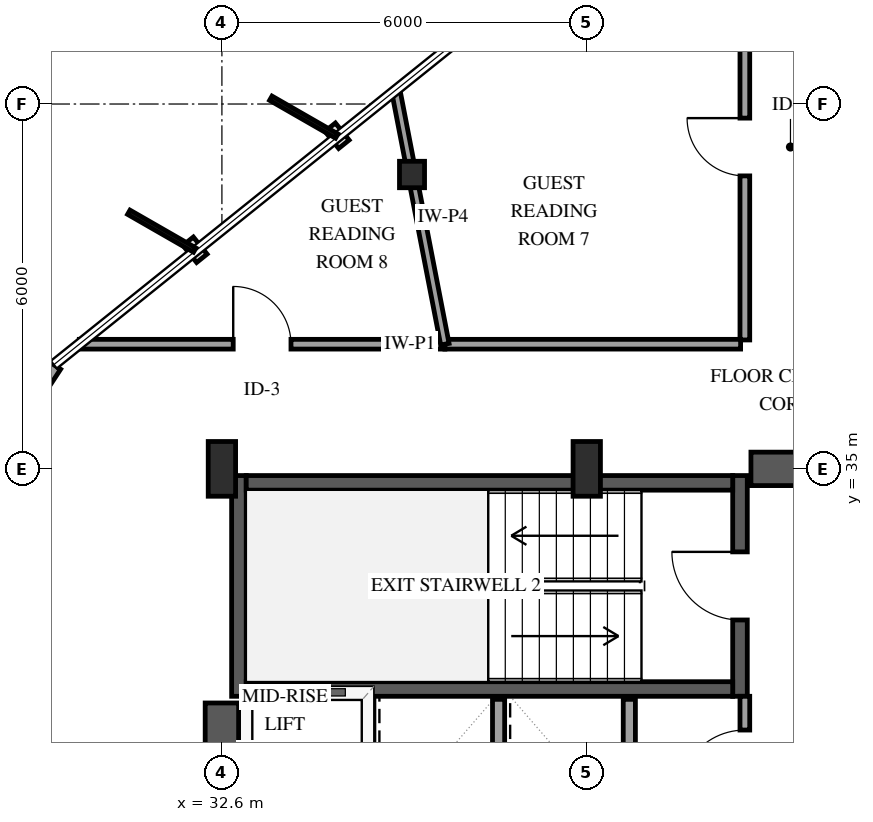
"""IFC4 building model, lengths in metres.
Left out: names, types, materials, properties, quantities, classifications, styles, units other than length and angle.
Written with IfcOpenShell. Run it as: python <this file> out.ifc"""

import sys

from ifc_helpers import new_model, si_unit, direction, frame, frame_2d, origin, origin_2d, place, context, subcontext, project, spatial, rectangle, i_section, extrude, element, fill, save


model = new_model("IFC4")
c1 = context("Model", 3, precision=1e-05, world=origin(), true_north=direction((0.0, 1.0)))
c2 = subcontext(c1, "Body", "Model", "MODEL_VIEW")
j1 = project(units=[si_unit("LENGTHUNIT", "METRE"), si_unit("PLANEANGLEUNIT", "RADIAN")], contexts=[c1])
p1 = place(None, origin())
s1 = spatial("IfcSite", under=j1, at=p1, CompositionType="ELEMENT")
p2 = place(p1, origin())
s2 = spatial("IfcBuilding", under=s1, at=p2, CompositionType="ELEMENT")
p3 = place(p2, frame((0.0, 0.0, 175.0)))
s3 = spatial("IfcBuildingStorey", under=s2, at=p3, CompositionType="ELEMENT", Elevation=175.0)
p4 = place(p3, frame((32.88, 31.26, 0.0), z_axis=(0.0, 0.0, 1.0), x_axis=(0.0, 1.0, 0.0)))
e1 = element("IfcWall", 1, at=p4, inside=s3, PredefinedType="SHEAR", context=c2, shape_type="SweptSolid", body=[
    extrude(rectangle(XDim=3.63, YDim=0.24, at=frame_2d((1.815, 0.0))), origin(), (0.0, 0.0, 1.0), 3.6),
])
p5 = place(p3, frame((41.12, 31.26, 0.0), z_axis=(0.0, 0.0, 1.0), x_axis=(0.0, 1.0, 0.0)))
e2 = element("IfcWall", 2, at=p5, inside=s3, PredefinedType="SHEAR", context=c2, shape_type="SweptSolid", body=[
    extrude(rectangle(XDim=3.63, YDim=0.24, at=frame_2d((1.815, 0.0))), origin(), (0.0, 0.0, 1.0), 3.6),
])
p6 = place(p5, frame((1.255, 0.0, 0.0)))
e3 = element("IfcOpeningElement", 3, at=p6, cuts=e2, PredefinedType="OPENING", context=c2, shape_type="SweptSolid", body=[
    extrude(rectangle(XDim=1.12, YDim=2.15, at=frame_2d((0.56, 1.075))), frame((0.0, 0.13, 0.0), z_axis=(0.0, -1.0, 0.0), x_axis=(1.0, 0.0, 0.0)), (0.0, 0.0, 1.0), 0.26),
])
for number, where, z_axis, x_axis in (
    (4, (33.0, 31.38, 0.0), (0.0, 0.0, 1.0), (1.0, 0.0, 0.0)),
    (5, (33.0, 34.77, 0.0), (0.0, 0.0, 1.0), (1.0, 0.0, 0.0)),
):
    element("IfcWall", number, at=place(p3, frame(where, z_axis=z_axis, x_axis=x_axis)), inside=s3, PredefinedType="SHEAR", context=c2, shape_type="SweptSolid", body=[
        extrude(rectangle(XDim=8.0, YDim=0.24, at=frame_2d((4.0, 0.0))), origin(), (0.0, 0.0, 1.0), 3.6),
    ])
p7 = place(p3, frame((32.6, 18.85, 0.0), z_axis=(0.0, 0.0, 1.0), x_axis=(0.0, 1.0, 0.0)))
e6 = element("IfcWall", 6, at=p7, inside=s3, PredefinedType="SHEAR", context=c2, shape_type="SweptSolid", body=[
    extrude(rectangle(XDim=12.3, YDim=0.55, at=frame_2d((6.15, 0.0))), origin(), (0.0, 0.0, 1.0), 3.6),
])
p8 = place(p3, frame((41.3, 35.0, 0.0), z_axis=(0.0, 0.0, 1.0), x_axis=(1.0, 0.0, 0.0)))
e7 = element("IfcWall", 7, at=p8, inside=s3, PredefinedType="SHEAR", context=c2, shape_type="SweptSolid", body=[
    extrude(rectangle(XDim=2.85, YDim=0.55, at=frame_2d((1.425, 0.0))), origin(), (0.0, 0.0, 1.0), 3.6),
])
for number, where, z_axis, x_axis in (
    (8, (32.6, 35.0, 0.0), (0.0, 0.0, 1.0), (1.0, 0.0, 0.0)),
    (9, (38.6, 35.0, 0.0), (0.0, 0.0, 1.0), (1.0, 0.0, 0.0)),
):
    element("IfcColumn", number, at=place(p3, frame(where, z_axis=z_axis, x_axis=x_axis)), inside=s3, PredefinedType="PILASTER", context=c2, shape_type="SweptSolid", body=[
        extrude(rectangle(XDim=0.45, YDim=0.9, at=origin_2d()), origin(), (0.0, 0.0, 1.0), 3.6),
    ])
p9 = place(p3, frame((35.726, 39.841, 0.0), z_axis=(0.0, 0.0, 1.0), x_axis=(1.0, 0.0, 0.0)))
e10 = element("IfcColumn", 10, at=p9, inside=s3, PredefinedType="COLUMN", context=c2, shape_type="SweptSolid", body=[
    extrude(i_section(OverallWidth=0.412, OverallDepth=0.435, WebThickness=0.036, FlangeThickness=0.057, FilletRadius=0.038, at=origin_2d()), origin(), (0.0, 0.0, 1.0), 3.6),
])
p10 = place(p3, frame((29.834, 36.713, 0.0), z_axis=(0.0, 0.0, 1.0), x_axis=(-0.548111634579, -0.836405186521, 0.0)))
e11 = element("IfcWall", 11, at=p10, inside=s3, PredefinedType="SOLIDWALL", context=c2, shape_type="SweptSolid", body=[
    extrude(rectangle(XDim=2.967, YDim=0.27, at=frame_2d((1.483, 0.0))), origin(), (0.0, 0.0, 1.0), 2.679),
])
p11 = place(p10, frame((1.033, 0.0, 0.75)))
e12 = element("IfcOpeningElement", 12, at=p11, cuts=e11, PredefinedType="OPENING", context=c2, shape_type="SweptSolid", body=[
    extrude(rectangle(XDim=0.9, YDim=1.5, at=frame_2d((0.45, 0.75))), frame((0.0, 0.145, 0.0), z_axis=(0.0, -1.0, 0.0), x_axis=(1.0, 0.0, 0.0)), (0.0, 0.0, 1.0), 0.29),
])
for number, where, z_axis, x_axis in (
    (13, (35.0, 29.11, 0.0), (0.0, 0.0, 1.0), (0.0, 1.0, 0.0)),
    (14, (37.15, 29.11, 0.0), (0.0, 0.0, 1.0), (0.0, 1.0, 0.0)),
    (15, (39.3, 29.11, 0.0), (0.0, 0.0, 1.0), (0.0, 1.0, 0.0)),
):
    element("IfcWall", number, at=place(p3, frame(where, z_axis=z_axis, x_axis=x_axis)), inside=s3, PredefinedType="SOLIDWALL", context=c2, shape_type="SweptSolid", body=[
        extrude(rectangle(XDim=2.1, YDim=0.2, at=frame_2d((1.05, 0.0))), origin(), (0.0, 0.0, 1.0), 3.3),
    ])
p12 = place(p3, frame((41.2, 37.12, 0.0), z_axis=(0.0, 0.0, 1.0), x_axis=(0.0, 1.0, 0.0)))
e16 = element("IfcWall", 16, at=p12, inside=s3, PredefinedType="PARTITIONING", context=c2, shape_type="SweptSolid", body=[
    extrude(rectangle(XDim=6.346, YDim=0.16, at=frame_2d((3.173, 0.0))), origin(), (0.0, 0.0, 1.0), 2.678),
])
p13 = place(p12, frame((2.698, 0.0, 0.0)))
e17 = element("IfcOpeningElement", 17, at=p13, cuts=e16, PredefinedType="OPENING", context=c2, shape_type="SweptSolid", body=[
    extrude(rectangle(XDim=0.95, YDim=2.15, at=frame_2d((0.475, 1.075))), frame((0.0, 0.09, 0.0), z_axis=(0.0, -1.0, 0.0), x_axis=(1.0, 0.0, 0.0)), (0.0, 0.0, 1.0), 0.18),
])
p14 = place(p3, frame((30.255, 37.05, 0.0), z_axis=(0.0, 0.0, 1.0), x_axis=(1.0, 0.0, 0.0)))
e18 = element("IfcWall", 18, at=p14, inside=s3, PredefinedType="PARTITIONING", context=c2, shape_type="SweptSolid", body=[
    extrude(rectangle(XDim=6.012, YDim=0.16, at=frame_2d((3.006, 0.0))), origin(), (0.0, 0.0, 1.0), 3.3),
])
p15 = place(p14, frame((2.531, 0.0, 0.0)))
e19 = element("IfcOpeningElement", 19, at=p15, cuts=e18, PredefinedType="OPENING", context=c2, shape_type="SweptSolid", body=[
    extrude(rectangle(XDim=0.95, YDim=2.15, at=frame_2d((0.475, 1.075))), frame((0.0, 0.09, 0.0), z_axis=(0.0, -1.0, 0.0), x_axis=(1.0, 0.0, 0.0)), (0.0, 0.0, 1.0), 0.18),
])
p16 = place(p3, frame((36.267, 37.05, 0.0), z_axis=(0.0, 0.0, 1.0), x_axis=(1.0, 0.0, 0.0)))
e20 = element("IfcWall", 20, at=p16, inside=s3, PredefinedType="PARTITIONING", context=c2, shape_type="SweptSolid", body=[
    extrude(rectangle(XDim=4.863, YDim=0.16, at=frame_2d((2.431, 0.0))), origin(), (0.0, 0.0, 1.0), 3.3),
])
p17 = place(p3, frame((36.267, 37.05, 0.0), z_axis=(0.0, 0.0, 1.0), x_axis=(-0.190164640644, 0.981752213875, 0.0)))
e21 = element("IfcWall", 21, at=p17, inside=s3, PredefinedType="PARTITIONING", context=c2, shape_type="SweptSolid", body=[
    extrude(rectangle(XDim=4.255, YDim=0.14, at=frame_2d((2.127, 0.0))), origin(), (0.0, 0.0, 1.0), 2.595),
])
p18 = place(p3, frame((41.2, 29.07, 0.0), z_axis=(0.0, 0.0, 1.0), x_axis=(0.0, 1.0, 0.0)))
e22 = element("IfcWall", 22, at=p18, inside=s3, PredefinedType="PARTITIONING", context=c2, shape_type="SweptSolid", body=[
    extrude(rectangle(XDim=2.19, YDim=0.16, at=frame_2d((1.095, 0.0))), origin(), (0.0, 0.0, 1.0), 3.3),
])
p19 = place(p18, frame((0.555, 0.0, 0.0)))
e23 = element("IfcOpeningElement", 23, at=p19, cuts=e22, PredefinedType="OPENING", context=c2, shape_type="SweptSolid", body=[
    extrude(rectangle(XDim=1.08, YDim=2.15, at=frame_2d((0.54, 1.075))), frame((0.0, 0.09, 0.0), z_axis=(0.0, -1.0, 0.0), x_axis=(1.0, 0.0, 0.0)), (0.0, 0.0, 1.0), 0.18),
])
p20 = place(p6, origin())
e24 = element("IfcDoor", 24, at=p20, inside=s3, OperationType="SINGLE_SWING_RIGHT", PredefinedType="DOOR", context=c2, shape_type="SweptSolid", body=[
    extrude(rectangle(XDim=1.12, YDim=2.15, at=frame_2d((0.56, 1.075))), frame((0.0, 0.025, 0.0), z_axis=(0.0, -1.0, 0.0), x_axis=(1.0, 0.0, 0.0)), (0.0, 0.0, 1.0), 0.05),
])
fill(e3, e24)
p21 = place(p13, origin())
e25 = element("IfcDoor", 25, at=p21, inside=s3, OperationType="SINGLE_SWING_RIGHT", PredefinedType="DOOR", context=c2, shape_type="SweptSolid", body=[
    extrude(rectangle(XDim=0.95, YDim=2.15, at=frame_2d((0.475, 1.075))), frame((0.0, 0.025, 0.0), z_axis=(0.0, -1.0, 0.0), x_axis=(1.0, 0.0, 0.0)), (0.0, 0.0, 1.0), 0.05),
])
fill(e17, e25)
p22 = place(p15, origin())
e26 = element("IfcDoor", 26, at=p22, inside=s3, OperationType="SINGLE_SWING_LEFT", PredefinedType="DOOR", context=c2, shape_type="SweptSolid", body=[
    extrude(rectangle(XDim=0.95, YDim=2.15, at=frame_2d((0.475, 1.075))), frame((0.0, 0.025, 0.0), z_axis=(0.0, -1.0, 0.0), x_axis=(1.0, 0.0, 0.0)), (0.0, 0.0, 1.0), 0.05),
])
fill(e19, e26)
p23 = place(p19, origin())
e27 = element("IfcDoor", 27, at=p23, inside=s3, OperationType="SINGLE_SWING_LEFT", PredefinedType="DOOR", context=c2, shape_type="SweptSolid", body=[
    extrude(rectangle(XDim=1.08, YDim=2.15, at=frame_2d((0.54, 1.075))), frame((0.0, 0.025, 0.0), z_axis=(0.0, -1.0, 0.0), x_axis=(1.0, 0.0, 0.0)), (0.0, 0.0, 1.0), 0.05),
])
fill(e23, e27)
save(model, sys.argv[1])
